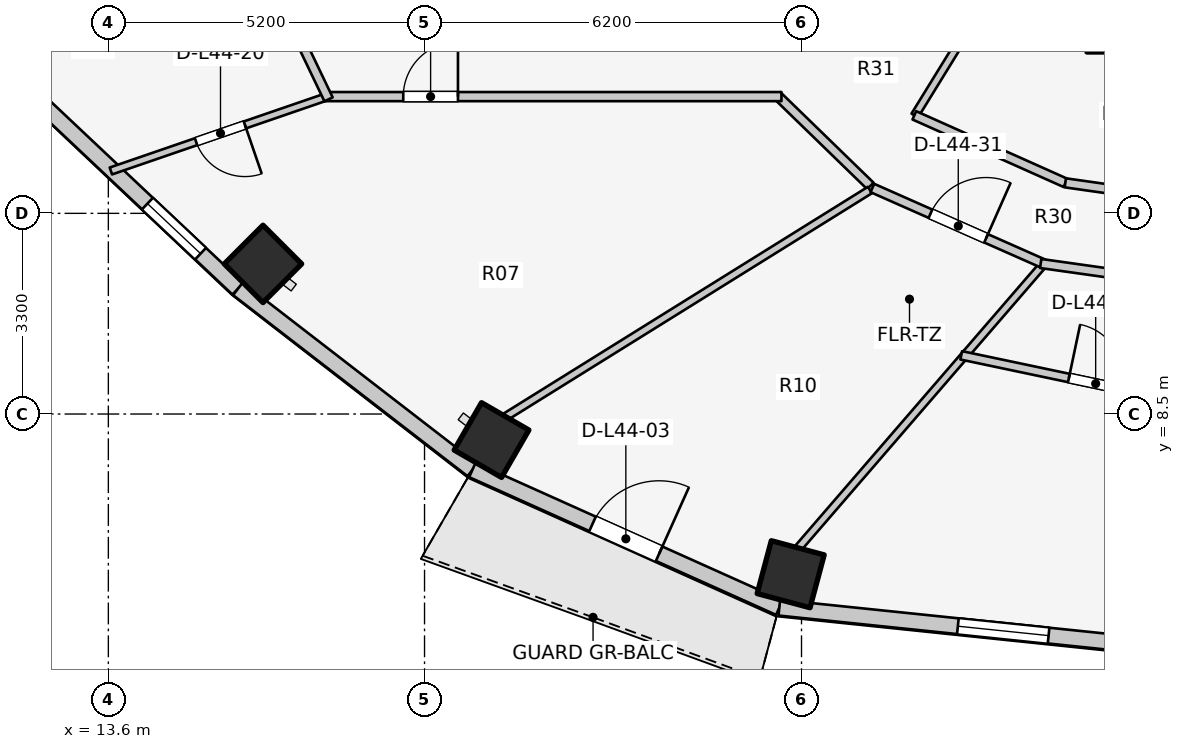
"""IFC4 building model, lengths in metres.
Left out: names, types, materials, properties, quantities, classifications, styles, units other than length and angle.
Written with IfcOpenShell. Run it as: python <this file> out.ifc"""

import sys

from ifc_helpers import new_model, si_unit, direction, frame, frame_2d, origin, origin_2d, place, context, subcontext, project, spatial, rectangle, extrude, element, fill, save


model = new_model("IFC4")
c1 = context("Model", 3, precision=1e-05, world=origin(), true_north=direction((0.0, 1.0)))
c2 = subcontext(c1, "Body", "Model", "MODEL_VIEW")
j1 = project(units=[si_unit("LENGTHUNIT", "METRE"), si_unit("PLANEANGLEUNIT", "RADIAN")], contexts=[c1])
p1 = place(None, origin())
s1 = spatial("IfcSite", under=j1, at=p1, CompositionType="ELEMENT")
p2 = place(p1, origin())
s2 = spatial("IfcBuilding", under=s1, at=p2, CompositionType="ELEMENT")
p3 = place(p2, frame((0.0, 0.0, 146.7)))
s3 = spatial("IfcBuildingStorey", under=s2, at=p3, CompositionType="ELEMENT", Elevation=146.7)
for number, where, z_axis, x_axis in (
    (1, (16.143, 10.969, 0.0), (0.0, 0.0, 1.0), (-0.707, -0.707, 0.0)),
    (2, (19.902, 8.072, 0.0), (0.0, 0.0, 1.0), (-0.5, -0.866, 0.0)),
    (3, (24.822, 5.865, 0.0), (0.0, 0.0, 1.0), (-0.259, -0.966, 0.0)),
):
    element("IfcColumn", number, at=place(p3, frame(where, z_axis=z_axis, x_axis=x_axis)), inside=s3, PredefinedType="COLUMN", context=c2, shape_type="SweptSolid", body=[
        extrude(rectangle(XDim=0.9, YDim=0.9, at=origin_2d()), origin(), (0.0, 0.0, 1.0), 3.1),
    ])
p4 = place(p3, frame((12.381, 13.716, 0.0), z_axis=(0.0, 0.0, 1.0), x_axis=(0.727667301037, -0.68593024354, 0.0)))
e4 = element("IfcWall", 4, at=p4, inside=s3, PredefinedType="STANDARD", context=c2, shape_type="SweptSolid", body=[
    extrude(rectangle(XDim=4.604, YDim=0.26, at=frame_2d((2.302, 0.0))), origin(), (0.0, 0.0, 1.0), 2.85),
])
p5 = place(p4, frame((2.56, 0.0, 0.75)))
e5 = element("IfcOpeningElement", 5, at=p5, cuts=e4, PredefinedType="OPENING", context=c2, shape_type="SweptSolid", body=[
    extrude(rectangle(XDim=1.2, YDim=1.5, at=frame_2d((0.6, 0.75))), frame((0.0, 0.14, 0.0), z_axis=(0.0, -1.0, 0.0), x_axis=(1.0, 0.0, 0.0)), (0.0, 0.0, 1.0), 0.28),
])
p6 = place(p3, frame((15.731, 10.559, 0.0), z_axis=(0.0, 0.0, 1.0), x_axis=(0.791460185804, -0.611220724687, 0.0)))
e6 = element("IfcWall", 6, at=p6, inside=s3, PredefinedType="STANDARD", context=c2, shape_type="SweptSolid", body=[
    extrude(rectangle(XDim=4.872, YDim=0.26, at=frame_2d((2.436, 0.0))), origin(), (0.0, 0.0, 1.0), 2.85),
])
p7 = place(p3, frame((19.587, 7.581, 0.0), z_axis=(0.0, 0.0, 1.0), x_axis=(0.912353637112, -0.409403029847, 0.0)))
e7 = element("IfcWall", 7, at=p7, inside=s3, PredefinedType="STANDARD", context=c2, shape_type="SweptSolid", body=[
    extrude(rectangle(XDim=5.533, YDim=0.26, at=frame_2d((2.766, 0.0))), origin(), (0.0, 0.0, 1.0), 2.88),
])
p8 = place(p7, frame((2.167, 0.0, 0.0)))
e8 = element("IfcOpeningElement", 8, at=p8, cuts=e7, PredefinedType="OPENING", context=c2, shape_type="SweptSolid", body=[
    extrude(rectangle(XDim=1.2, YDim=2.2, at=frame_2d((0.6, 1.1))), frame((0.0, 0.14, 0.0), z_axis=(0.0, -1.0, 0.0), x_axis=(1.0, 0.0, 0.0)), (0.0, 0.0, 1.0), 0.28),
])
p9 = place(p3, frame((24.635, 5.315, 0.0), z_axis=(0.0, 0.0, 1.0), x_axis=(0.994664178965, -0.10316574569, 0.0)))
e9 = element("IfcWall", 9, at=p9, inside=s3, PredefinedType="STANDARD", context=c2, shape_type="SweptSolid", body=[
    extrude(rectangle(XDim=7.405, YDim=0.26, at=frame_2d((3.702, 0.0))), origin(), (0.0, 0.0, 1.0), 2.85),
])
p10 = place(p9, frame((2.952, 0.0, 0.75)))
e10 = element("IfcOpeningElement", 10, at=p10, cuts=e9, PredefinedType="OPENING", context=c2, shape_type="SweptSolid", body=[
    extrude(rectangle(XDim=1.5, YDim=1.6, at=frame_2d((0.75, 0.8))), frame((0.0, 0.14, 0.0), z_axis=(0.0, -1.0, 0.0), x_axis=(1.0, 0.0, 0.0)), (0.0, 0.0, 1.0), 0.28),
])
p11 = place(p3, frame((17.247, 13.736, 0.0), z_axis=(0.0, 0.0, 1.0), x_axis=(-0.945683523506, -0.325088716151, 0.0)))
e11 = element("IfcWall", 11, at=p11, inside=s3, PredefinedType="MOVABLE", context=c2, shape_type="SweptSolid", body=[
    extrude(rectangle(XDim=3.813, YDim=0.12, at=frame_2d((1.906, 0.0))), origin(), (0.0, 0.0, 1.0), 2.22),
])
p12 = place(p11, frame((1.481, 0.0, 0.0)))
e12 = element("IfcOpeningElement", 12, at=p12, cuts=e11, PredefinedType="OPENING", context=c2, shape_type="SweptSolid", body=[
    extrude(rectangle(XDim=0.85, YDim=2.05, at=frame_2d((0.425, 1.025))), frame((0.0, 0.07, 0.0), z_axis=(0.0, -1.0, 0.0), x_axis=(1.0, 0.0, 0.0)), (0.0, 0.0, 1.0), 0.14),
])
p13 = place(p3, frame((26.133, 12.251, 0.0), z_axis=(0.0, 0.0, 1.0), x_axis=(-0.717419568599, 0.696641344302, 0.0)))
e13 = element("IfcWall", 13, at=p13, inside=s3, PredefinedType="PARTITIONING", context=c2, shape_type="SweptSolid", body=[
    extrude(rectangle(XDim=2.138, YDim=0.15, at=frame_2d((1.069, 0.0))), origin(), (0.0, 0.0, 1.0), 2.299),
])
p14 = place(p3, frame((17.15, 13.72, 0.0), z_axis=(0.0, 0.0, 1.0), x_axis=(1.0, 0.0, 0.0)))
e14 = element("IfcWall", 14, at=p14, inside=s3, PredefinedType="PARTITIONING", context=c2, shape_type="SweptSolid", body=[
    extrude(rectangle(XDim=7.52, YDim=0.15, at=frame_2d((3.76, 0.0))), origin(), (0.0, 0.0, 1.0), 2.299),
])
p15 = place(p14, frame((1.3, 0.0, 0.0)))
e15 = element("IfcOpeningElement", 15, at=p15, cuts=e14, PredefinedType="OPENING", context=c2, shape_type="SweptSolid", body=[
    extrude(rectangle(XDim=0.9, YDim=2.1, at=frame_2d((0.45, 1.05))), frame((0.0, 0.085, 0.0), z_axis=(0.0, -1.0, 0.0), x_axis=(1.0, 0.0, 0.0)), (0.0, 0.0, 1.0), 0.17),
])
p16 = place(p3, frame((17.222, 13.675, 0.0), z_axis=(0.0, 0.0, 1.0), x_axis=(-0.431973389813, 0.901886351207, 0.0)))
e16 = element("IfcWall", 16, at=p16, inside=s3, PredefinedType="PARTITIONING", context=c2, shape_type="SweptSolid", body=[
    extrude(rectangle(XDim=2.452, YDim=0.15, at=frame_2d((1.226, 0.0))), origin(), (0.0, 0.0, 1.0), 2.855),
])
p17 = place(p3, frame((28.45, 15.985, 0.0), z_axis=(0.0, 0.0, 1.0), x_axis=(-0.524565340045, -0.851370192116, 0.0)))
e17 = element("IfcWall", 17, at=p17, inside=s3, PredefinedType="PARTITIONING", context=c2, shape_type="SweptSolid", body=[
    extrude(rectangle(XDim=3.027, YDim=0.125, at=frame_2d((1.514, 0.0))), origin(), (0.0, 0.0, 1.0), 2.299),
])
p18 = place(p3, frame((26.856, 13.412, 0.0), z_axis=(0.0, 0.0, 1.0), x_axis=(0.912985265053, -0.407992531545, 0.0)))
e18 = element("IfcWall", 18, at=p18, inside=s3, PredefinedType="PARTITIONING", context=c2, shape_type="SweptSolid", body=[
    extrude(rectangle(XDim=2.723, YDim=0.15, at=frame_2d((1.362, 0.0))), origin(), (0.0, 0.0, 1.0), 2.299),
])
p19 = place(p3, frame((29.339, 12.302, 0.0), z_axis=(0.0, 0.0, 1.0), x_axis=(0.990079774468, -0.140506370634, 0.0)))
e19 = element("IfcWall", 19, at=p19, inside=s3, PredefinedType="PARTITIONING", context=c2, shape_type="SweptSolid", body=[
    extrude(rectangle(XDim=2.69, YDim=0.15, at=frame_2d((1.345, 0.0))), origin(), (0.0, 0.0, 1.0), 2.299),
])
p20 = place(p19, frame((0.87, 0.0, 0.0)))
e20 = element("IfcOpeningElement", 20, at=p20, cuts=e19, PredefinedType="OPENING", context=c2, shape_type="SweptSolid", body=[
    extrude(rectangle(XDim=0.95, YDim=2.1, at=frame_2d((0.475, 1.05))), frame((0.0, 0.085, 0.0), z_axis=(0.0, -1.0, 0.0), x_axis=(1.0, 0.0, 0.0)), (0.0, 0.0, 1.0), 0.17),
])
p21 = place(p3, frame((26.125, 12.184, 0.0), z_axis=(0.0, 0.0, 1.0), x_axis=(-0.849008457073, -0.528379257559, 0.0)))
e21 = element("IfcWall", 21, at=p21, inside=s3, PredefinedType="PARTITIONING", context=c2, shape_type="SweptSolid", body=[
    extrude(rectangle(XDim=7.077, YDim=0.125, at=frame_2d((3.539, 0.0))), origin(), (0.0, 0.0, 1.0), 2.299),
])
p22 = place(p3, frame((28.947, 10.927, 0.0), z_axis=(0.0, 0.0, 1.0), x_axis=(-0.653779283332, -0.756685303601, 0.0)))
e22 = element("IfcWall", 22, at=p22, inside=s3, PredefinedType="PARTITIONING", context=c2, shape_type="SweptSolid", body=[
    extrude(rectangle(XDim=6.14, YDim=0.125, at=frame_2d((3.07, 0.0))), origin(), (0.0, 0.0, 1.0), 2.299),
])
p23 = place(p3, frame((26.165, 12.217, 0.0), z_axis=(0.0, 0.0, 1.0), x_axis=(0.91445214467, -0.404694051239, 0.0)))
e23 = element("IfcWall", 23, at=p23, inside=s3, PredefinedType="PARTITIONING", context=c2, shape_type="SweptSolid", body=[
    extrude(rectangle(XDim=3.091, YDim=0.15, at=frame_2d((1.545, 0.0))), origin(), (0.0, 0.0, 1.0), 2.299),
])
p24 = place(p23, frame((1.045, 0.0, 0.0)))
e24 = element("IfcOpeningElement", 24, at=p24, cuts=e23, PredefinedType="OPENING", context=c2, shape_type="SweptSolid", body=[
    extrude(rectangle(XDim=1.0, YDim=2.1, at=frame_2d((0.5, 1.05))), frame((0.0, 0.085, 0.0), z_axis=(0.0, -1.0, 0.0), x_axis=(1.0, 0.0, 0.0)), (0.0, 0.0, 1.0), 0.17),
])
p25 = place(p3, frame((28.934, 10.975, 0.0), z_axis=(0.0, 0.0, 1.0), x_axis=(0.990254405439, -0.139270285808, 0.0)))
e25 = element("IfcWall", 25, at=p25, inside=s3, PredefinedType="PARTITIONING", context=c2, shape_type="SweptSolid", body=[
    extrude(rectangle(XDim=3.147, YDim=0.15, at=frame_2d((1.573, 0.0))), origin(), (0.0, 0.0, 1.0), 2.299),
])
p26 = place(p3, frame((27.627, 9.465, 0.0), z_axis=(0.0, 0.0, 1.0), x_axis=(0.97851996891, -0.206152056609, 0.0)))
e26 = element("IfcWall", 26, at=p26, inside=s3, PredefinedType="PLUMBINGWALL", context=c2, shape_type="SweptSolid", body=[
    extrude(rectangle(XDim=4.519, YDim=0.14, at=frame_2d((2.26, 0.0))), origin(), (0.0, 0.0, 1.0), 2.299),
])
p27 = place(p26, frame((1.81, 0.0, 0.0)))
e27 = element("IfcOpeningElement", 27, at=p27, cuts=e26, PredefinedType="OPENING", context=c2, shape_type="SweptSolid", body=[
    extrude(rectangle(XDim=0.9, YDim=2.1, at=frame_2d((0.45, 1.05))), frame((0.0, 0.08, 0.0), z_axis=(0.0, -1.0, 0.0), x_axis=(1.0, 0.0, 0.0)), (0.0, 0.0, 1.0), 0.16),
])
p28 = place(p5, origin())
e28 = element("IfcWindow", 28, at=p28, inside=s3, PartitioningType="SINGLE_PANEL", PredefinedType="WINDOW", context=c2, shape_type="SweptSolid", body=[
    extrude(rectangle(XDim=1.2, YDim=1.5, at=frame_2d((0.6, 0.75))), frame((0.0, 0.03, 0.0), z_axis=(0.0, -1.0, 0.0), x_axis=(1.0, 0.0, 0.0)), (0.0, 0.0, 1.0), 0.06),
])
fill(e5, e28)
p29 = place(p8, origin())
e29 = element("IfcDoor", 29, at=p29, inside=s3, OperationType="SINGLE_SWING_RIGHT", PredefinedType="DOOR", context=c2, shape_type="SweptSolid", body=[
    extrude(rectangle(XDim=1.2, YDim=2.2, at=frame_2d((0.6, 1.1))), frame((0.0, 0.025, 0.0), z_axis=(0.0, -1.0, 0.0), x_axis=(1.0, 0.0, 0.0)), (0.0, 0.0, 1.0), 0.05),
])
fill(e8, e29)
p30 = place(p10, origin())
e30 = element("IfcWindow", 30, at=p30, inside=s3, PartitioningType="SINGLE_PANEL", PredefinedType="WINDOW", context=c2, shape_type="SweptSolid", body=[
    extrude(rectangle(XDim=1.5, YDim=1.6, at=frame_2d((0.75, 0.8))), frame((0.0, 0.03, 0.0), z_axis=(0.0, -1.0, 0.0), x_axis=(1.0, 0.0, 0.0)), (0.0, 0.0, 1.0), 0.06),
])
fill(e10, e30)
p31 = place(p12, origin())
e31 = element("IfcDoor", 31, at=p31, inside=s3, OperationType="SINGLE_SWING_LEFT", PredefinedType="DOOR", context=c2, shape_type="SweptSolid", body=[
    extrude(rectangle(XDim=0.85, YDim=2.05, at=frame_2d((0.425, 1.025))), frame((0.0, 0.025, 0.0), z_axis=(0.0, -1.0, 0.0), x_axis=(1.0, 0.0, 0.0)), (0.0, 0.0, 1.0), 0.05),
])
fill(e12, e31)
p32 = place(p15, origin())
e32 = element("IfcDoor", 32, at=p32, inside=s3, OperationType="SINGLE_SWING_RIGHT", PredefinedType="DOOR", context=c2, shape_type="SweptSolid", body=[
    extrude(rectangle(XDim=0.9, YDim=2.1, at=frame_2d((0.45, 1.05))), frame((0.0, 0.025, 0.0), z_axis=(0.0, -1.0, 0.0), x_axis=(1.0, 0.0, 0.0)), (0.0, 0.0, 1.0), 0.05),
])
fill(e15, e32)
p33 = place(p24, origin())
e33 = element("IfcDoor", 33, at=p33, inside=s3, OperationType="SINGLE_SWING_RIGHT", PredefinedType="DOOR", context=c2, shape_type="SweptSolid", body=[
    extrude(rectangle(XDim=1.0, YDim=2.1, at=frame_2d((0.5, 1.05))), frame((0.0, 0.025, 0.0), z_axis=(0.0, -1.0, 0.0), x_axis=(1.0, 0.0, 0.0)), (0.0, 0.0, 1.0), 0.05),
])
fill(e24, e33)
p34 = place(p27, origin())
e34 = element("IfcDoor", 34, at=p34, inside=s3, OperationType="SINGLE_SWING_LEFT", PredefinedType="DOOR", context=c2, shape_type="SweptSolid", body=[
    extrude(rectangle(XDim=0.9, YDim=2.1, at=frame_2d((0.45, 1.05))), frame((0.0, 0.025, 0.0), z_axis=(0.0, -1.0, 0.0), x_axis=(1.0, 0.0, 0.0)), (0.0, 0.0, 1.0), 0.05),
])
fill(e27, e34)
save(model, sys.argv[1])
